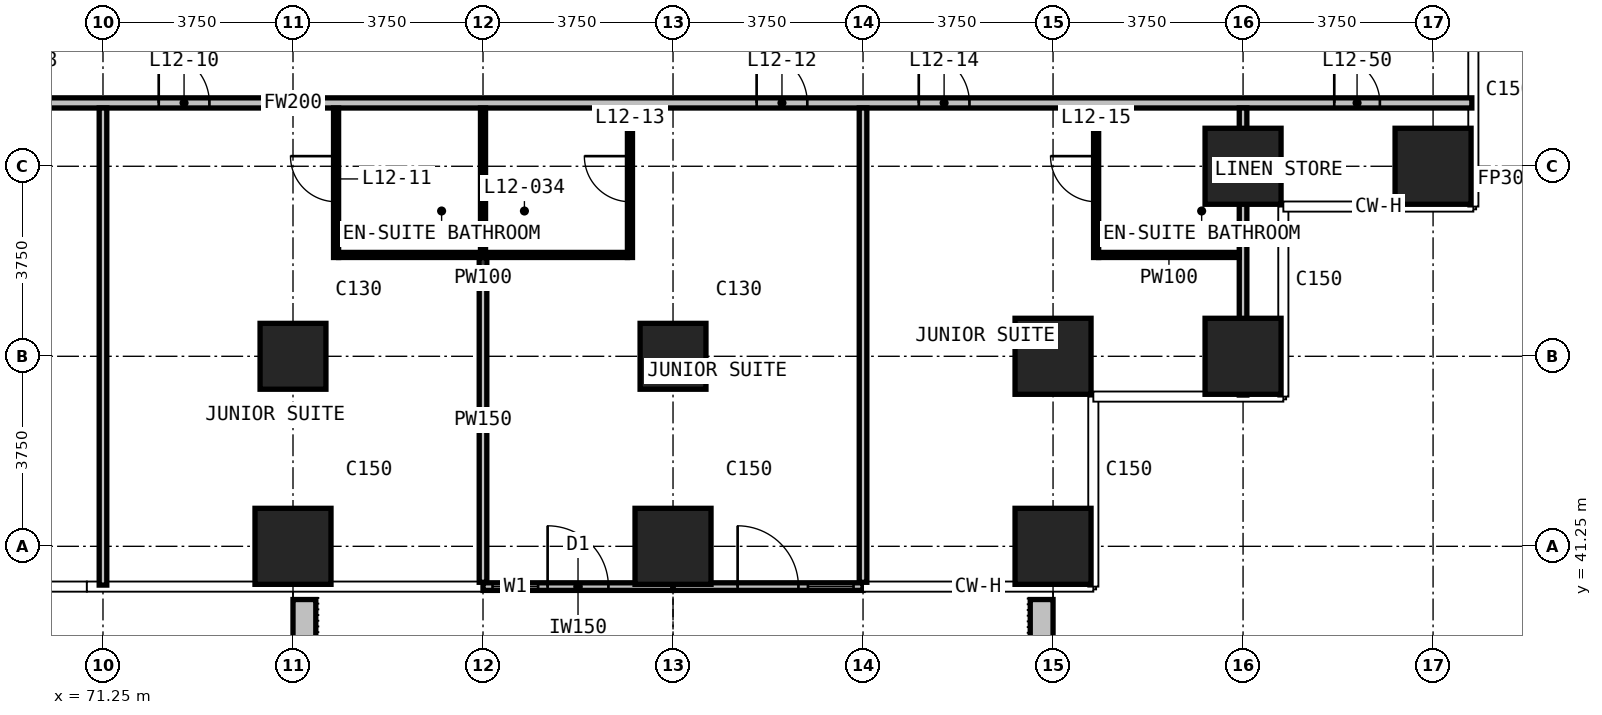
"""IFC4 building model, lengths in metres.
Left out: names, types, materials, properties, quantities, classifications, styles, units other than length and angle.
Written with IfcOpenShell. Run it as: python <this file> out.ifc"""

import sys

from ifc_helpers import new_model, si_unit, direction, frame, frame_2d, origin, origin_2d, place, context, subcontext, project, spatial, rectangle, extrude, element, fill, save


model = new_model("IFC4")
c1 = context("Model", 3, precision=1e-05, world=origin(), true_north=direction((0.0, 1.0)))
c2 = subcontext(c1, "Body", "Model", "MODEL_VIEW")
j1 = project(units=[si_unit("LENGTHUNIT", "METRE"), si_unit("PLANEANGLEUNIT", "RADIAN")], contexts=[c1])
p1 = place(None, origin())
s1 = spatial("IfcSite", under=j1, at=p1, CompositionType="ELEMENT")
p2 = place(p1, origin())
s2 = spatial("IfcBuilding", under=s1, at=p2, CompositionType="ELEMENT")
p3 = place(p2, frame((0.0, 0.0, 59.3)))
s3 = spatial("IfcBuildingStorey", under=s2, at=p3, CompositionType="ELEMENT", Elevation=59.3)
p4 = place(p3, frame((75.0, 41.25, 0.0), z_axis=(0.0, 0.0, 1.0), x_axis=(1.0, 0.0, 0.0)))
e1 = element("IfcColumn", 1, at=p4, inside=s3, PredefinedType="COLUMN", context=c2, shape_type="SweptSolid", body=[
    extrude(rectangle(XDim=1.5, YDim=1.5, at=origin_2d()), origin(), (0.0, 0.0, 1.0), 3.3),
])
p5 = place(p3, frame((75.0, 45.0, 0.0), z_axis=(0.0, 0.0, 1.0), x_axis=(1.0, 0.0, 0.0)))
e2 = element("IfcColumn", 2, at=p5, inside=s3, PredefinedType="COLUMN", context=c2, shape_type="SweptSolid", body=[
    extrude(rectangle(XDim=1.3, YDim=1.3, at=origin_2d()), origin(), (0.0, 0.0, 1.0), 3.3),
])
p6 = place(p3, frame((82.5, 41.25, 0.0), z_axis=(0.0, 0.0, 1.0), x_axis=(1.0, 0.0, 0.0)))
e3 = element("IfcColumn", 3, at=p6, inside=s3, PredefinedType="COLUMN", context=c2, shape_type="SweptSolid", body=[
    extrude(rectangle(XDim=1.5, YDim=1.5, at=origin_2d()), origin(), (0.0, 0.0, 1.0), 3.3),
])
p7 = place(p3, frame((82.5, 45.0, 0.0), z_axis=(0.0, 0.0, 1.0), x_axis=(1.0, 0.0, 0.0)))
e4 = element("IfcColumn", 4, at=p7, inside=s3, PredefinedType="COLUMN", context=c2, shape_type="SweptSolid", body=[
    extrude(rectangle(XDim=1.3, YDim=1.3, at=origin_2d()), origin(), (0.0, 0.0, 1.0), 3.3),
])
for number, where, z_axis, x_axis in (
    (5, (90.0, 41.25, 0.0), (0.0, 0.0, 1.0), (1.0, 0.0, 0.0)),
    (6, (90.0, 45.0, 0.0), (0.0, 0.0, 1.0), (1.0, 0.0, 0.0)),
    (7, (93.75, 45.0, 0.0), (0.0, 0.0, 1.0), (1.0, 0.0, 0.0)),
    (8, (93.75, 48.75, 0.0), (0.0, 0.0, 1.0), (1.0, 0.0, 0.0)),
    (9, (97.5, 48.75, 0.0), (0.0, 0.0, 1.0), (1.0, 0.0, 0.0)),
):
    element("IfcColumn", number, at=place(p3, frame(where, z_axis=z_axis, x_axis=x_axis)), inside=s3, PredefinedType="COLUMN", context=c2, shape_type="SweptSolid", body=[
        extrude(rectangle(XDim=1.5, YDim=1.5, at=origin_2d()), origin(), (0.0, 0.0, 1.0), 3.3),
    ])
p8 = place(p3, frame((78.75, 40.455, 0.0), z_axis=(0.0, 0.0, 1.0), x_axis=(1.0, 0.0, 0.0)))
e10 = element("IfcWall", 10, at=p8, inside=s3, PredefinedType="SOLIDWALL", context=c2, shape_type="SweptSolid", body=[
    extrude(rectangle(XDim=3.75, YDim=0.15, at=frame_2d((1.875, 0.0))), origin(), (0.0, 0.0, 1.0), 3.0),
])
p9 = place(p8, frame((0.188, 0.0, 0.1)))
e11 = element("IfcOpeningElement", 11, at=p9, cuts=e10, PredefinedType="OPENING", context=c2, shape_type="SweptSolid", body=[
    extrude(rectangle(XDim=0.9, YDim=2.4, at=frame_2d((0.45, 1.2))), frame((0.0, 0.085, 0.0), z_axis=(0.0, -1.0, 0.0), x_axis=(1.0, 0.0, 0.0)), (0.0, 0.0, 1.0), 0.17),
])
p10 = place(p8, frame((1.275, 0.0, 0.0)))
e12 = element("IfcOpeningElement", 12, at=p10, cuts=e10, PredefinedType="OPENING", context=c2, shape_type="SweptSolid", body=[
    extrude(rectangle(XDim=1.2, YDim=2.4, at=frame_2d((0.6, 1.2))), frame((0.0, 0.085, 0.0), z_axis=(0.0, -1.0, 0.0), x_axis=(1.0, 0.0, 0.0)), (0.0, 0.0, 1.0), 0.17),
])
p11 = place(p3, frame((82.5, 40.455, 0.0), z_axis=(0.0, 0.0, 1.0), x_axis=(1.0, 0.0, 0.0)))
e13 = element("IfcWall", 13, at=p11, inside=s3, PredefinedType="SOLIDWALL", context=c2, shape_type="SweptSolid", body=[
    extrude(rectangle(XDim=3.75, YDim=0.15, at=frame_2d((1.875, 0.0))), origin(), (0.0, 0.0, 1.0), 3.0),
])
p12 = place(p11, frame((1.275, 0.0, 0.0)))
e14 = element("IfcOpeningElement", 14, at=p12, cuts=e13, PredefinedType="OPENING", context=c2, shape_type="SweptSolid", body=[
    extrude(rectangle(XDim=1.2, YDim=2.4, at=frame_2d((0.6, 1.2))), frame((0.0, 0.085, 0.0), z_axis=(0.0, -1.0, 0.0), x_axis=(1.0, 0.0, 0.0)), (0.0, 0.0, 1.0), 0.17),
])
p13 = place(p11, frame((2.663, 0.0, 0.1)))
e15 = element("IfcOpeningElement", 15, at=p13, cuts=e13, PredefinedType="OPENING", context=c2, shape_type="SweptSolid", body=[
    extrude(rectangle(XDim=0.9, YDim=2.4, at=frame_2d((0.45, 1.2))), frame((0.0, 0.085, 0.0), z_axis=(0.0, -1.0, 0.0), x_axis=(1.0, 0.0, 0.0)), (0.0, 0.0, 1.0), 0.17),
])
for number, where, z_axis, x_axis in (
    (16, (75.225, 40.2, 0.0), (0.0, 0.0, 1.0), (0.0, -1.0, 0.0)),
    (17, (89.775, 40.2, 0.0), (0.0, 0.0, 1.0), (0.0, -1.0, 0.0)),
):
    element("IfcWall", number, at=place(p3, frame(where, z_axis=z_axis, x_axis=x_axis)), inside=s3, PredefinedType="USERDEFINED", context=c2, shape_type="SweptSolid", body=[
        extrude(rectangle(XDim=2.35, YDim=0.45, at=frame_2d((1.175, 0.0))), origin(), (0.0, 0.0, 1.0), 1.1),
    ])
p14 = place(p3, frame((51.735, 50.0, 0.0), z_axis=(0.0, 0.0, 1.0), x_axis=(1.0, 0.0, 0.0)))
e18 = element("IfcWall", 18, at=p14, inside=s3, PredefinedType="PARTITIONING", context=c2, shape_type="SweptSolid", body=[
    extrude(rectangle(XDim=46.53, YDim=0.2, at=frame_2d((23.265, 0.0))), origin(), (0.0, 0.0, 1.0), 3.0),
])
p15 = place(p14, frame((5.615, 0.0, 0.0)))
e19 = element("IfcOpeningElement", 19, at=p15, cuts=e18, PredefinedType="OPENING", context=c2, shape_type="SweptSolid", body=[
    extrude(rectangle(XDim=1.0, YDim=2.2, at=frame_2d((0.5, 1.1))), frame((0.0, 0.11, 0.0), z_axis=(0.0, -1.0, 0.0), x_axis=(1.0, 0.0, 0.0)), (0.0, 0.0, 1.0), 0.22),
])
p16 = place(p14, frame((17.415, 0.0, 0.0)))
e20 = element("IfcOpeningElement", 20, at=p16, cuts=e18, PredefinedType="OPENING", context=c2, shape_type="SweptSolid", body=[
    extrude(rectangle(XDim=1.0, YDim=2.2, at=frame_2d((0.5, 1.1))), frame((0.0, 0.11, 0.0), z_axis=(0.0, -1.0, 0.0), x_axis=(1.0, 0.0, 0.0)), (0.0, 0.0, 1.0), 0.22),
])
p17 = place(p14, frame((20.615, 0.0, 0.0)))
e21 = element("IfcOpeningElement", 21, at=p17, cuts=e18, PredefinedType="OPENING", context=c2, shape_type="SweptSolid", body=[
    extrude(rectangle(XDim=1.0, YDim=2.2, at=frame_2d((0.5, 1.1))), frame((0.0, 0.11, 0.0), z_axis=(0.0, -1.0, 0.0), x_axis=(1.0, 0.0, 0.0)), (0.0, 0.0, 1.0), 0.22),
])
p18 = place(p14, frame((32.415, 0.0, 0.0)))
e22 = element("IfcOpeningElement", 22, at=p18, cuts=e18, PredefinedType="OPENING", context=c2, shape_type="SweptSolid", body=[
    extrude(rectangle(XDim=1.0, YDim=2.2, at=frame_2d((0.5, 1.1))), frame((0.0, 0.11, 0.0), z_axis=(0.0, -1.0, 0.0), x_axis=(1.0, 0.0, 0.0)), (0.0, 0.0, 1.0), 0.22),
])
p19 = place(p14, frame((35.615, 0.0, 0.0)))
e23 = element("IfcOpeningElement", 23, at=p19, cuts=e18, PredefinedType="OPENING", context=c2, shape_type="SweptSolid", body=[
    extrude(rectangle(XDim=1.0, YDim=2.2, at=frame_2d((0.5, 1.1))), frame((0.0, 0.11, 0.0), z_axis=(0.0, -1.0, 0.0), x_axis=(1.0, 0.0, 0.0)), (0.0, 0.0, 1.0), 0.22),
])
p20 = place(p14, frame((1.8, 0.0, 0.0)))
e24 = element("IfcOpeningElement", 24, at=p20, cuts=e18, PredefinedType="OPENING", context=c2, shape_type="SweptSolid", body=[
    extrude(rectangle(XDim=0.9, YDim=2.2, at=frame_2d((0.45, 1.1))), frame((0.0, 0.11, 0.0), z_axis=(0.0, -1.0, 0.0), x_axis=(1.0, 0.0, 0.0)), (0.0, 0.0, 1.0), 0.22),
])
p21 = place(p14, frame((43.815, 0.0, 0.0)))
e25 = element("IfcOpeningElement", 25, at=p21, cuts=e18, PredefinedType="OPENING", context=c2, shape_type="SweptSolid", body=[
    extrude(rectangle(XDim=0.9, YDim=2.2, at=frame_2d((0.45, 1.1))), frame((0.0, 0.11, 0.0), z_axis=(0.0, -1.0, 0.0), x_axis=(1.0, 0.0, 0.0)), (0.0, 0.0, 1.0), 0.22),
])
p22 = place(p3, frame((71.25, 40.485, 0.0), z_axis=(0.0, 0.0, 1.0), x_axis=(0.0, 1.0, 0.0)))
e26 = element("IfcWall", 26, at=p22, inside=s3, PredefinedType="PARTITIONING", context=c2, shape_type="SweptSolid", body=[
    extrude(rectangle(XDim=9.415, YDim=0.15, at=frame_2d((4.708, 0.0))), origin(), (0.0, 0.0, 1.0), 3.0),
])
p23 = place(p3, frame((78.75, 40.54, 0.0), z_axis=(0.0, 0.0, 1.0), x_axis=(0.0, 1.0, 0.0)))
e27 = element("IfcWall", 27, at=p23, inside=s3, PredefinedType="PARTITIONING", context=c2, shape_type="SweptSolid", body=[
    extrude(rectangle(XDim=6.41, YDim=0.15, at=frame_2d((3.205, 0.0))), origin(), (0.0, 0.0, 1.0), 3.0),
])
p24 = place(p3, frame((86.25, 40.54, 0.0), z_axis=(0.0, 0.0, 1.0), x_axis=(0.0, 1.0, 0.0)))
e28 = element("IfcWall", 28, at=p24, inside=s3, PredefinedType="PARTITIONING", context=c2, shape_type="SweptSolid", body=[
    extrude(rectangle(XDim=9.36, YDim=0.15, at=frame_2d((4.68, 0.0))), origin(), (0.0, 0.0, 1.0), 3.0),
])
p25 = place(p3, frame((93.75, 44.235, 0.0), z_axis=(0.0, 0.0, 1.0), x_axis=(0.0, 1.0, 0.0)))
e29 = element("IfcWall", 29, at=p25, inside=s3, PredefinedType="PARTITIONING", context=c2, shape_type="SweptSolid", body=[
    extrude(rectangle(XDim=5.665, YDim=0.15, at=frame_2d((2.833, 0.0))), origin(), (0.0, 0.0, 1.0), 3.0),
])
p26 = place(p3, frame((75.9, 47.0, 0.0), z_axis=(0.0, 0.0, 1.0), x_axis=(1.0, 0.0, 0.0)))
e30 = element("IfcWall", 30, at=p26, inside=s3, PredefinedType="PARTITIONING", context=c2, shape_type="SweptSolid", body=[
    extrude(rectangle(XDim=5.7, YDim=0.1, at=frame_2d((2.85, 0.0))), origin(), (0.0, 0.0, 1.0), 3.0),
])
p27 = place(p3, frame((90.9, 47.0, 0.0), z_axis=(0.0, 0.0, 1.0), x_axis=(1.0, 0.0, 0.0)))
e31 = element("IfcWall", 31, at=p27, inside=s3, PredefinedType="PARTITIONING", context=c2, shape_type="SweptSolid", body=[
    extrude(rectangle(XDim=2.775, YDim=0.1, at=frame_2d((1.388, 0.0))), origin(), (0.0, 0.0, 1.0), 3.0),
])
p28 = place(p3, frame((75.85, 46.95, 0.0), z_axis=(0.0, 0.0, 1.0), x_axis=(0.0, 1.0, 0.0)))
e32 = element("IfcWall", 32, at=p28, inside=s3, PredefinedType="PARTITIONING", context=c2, shape_type="SweptSolid", body=[
    extrude(rectangle(XDim=2.95, YDim=0.1, at=frame_2d((1.475, 0.0))), origin(), (0.0, 0.0, 1.0), 3.0),
])
p29 = place(p28, frame((1.1, 0.0, 0.0)))
e33 = element("IfcOpeningElement", 33, at=p29, cuts=e32, PredefinedType="OPENING", context=c2, shape_type="SweptSolid", body=[
    extrude(rectangle(XDim=0.9, YDim=2.2, at=frame_2d((0.45, 1.1))), frame((0.0, 0.06, 0.0), z_axis=(0.0, -1.0, 0.0), x_axis=(1.0, 0.0, 0.0)), (0.0, 0.0, 1.0), 0.12),
])
p30 = place(p3, frame((78.75, 47.05, 0.0), z_axis=(0.0, 0.0, 1.0), x_axis=(0.0, 1.0, 0.0)))
e34 = element("IfcWall", 34, at=p30, inside=s3, PredefinedType="PARTITIONING", context=c2, shape_type="SweptSolid", body=[
    extrude(rectangle(XDim=2.85, YDim=0.1, at=frame_2d((1.425, 0.0))), origin(), (0.0, 0.0, 1.0), 3.0),
])
p31 = place(p3, frame((81.65, 46.95, 0.0), z_axis=(0.0, 0.0, 1.0), x_axis=(0.0, 1.0, 0.0)))
e35 = element("IfcWall", 35, at=p31, inside=s3, PredefinedType="PARTITIONING", context=c2, shape_type="SweptSolid", body=[
    extrude(rectangle(XDim=2.95, YDim=0.1, at=frame_2d((1.475, 0.0))), origin(), (0.0, 0.0, 1.0), 3.0),
])
p32 = place(p31, frame((1.1, 0.0, 0.0)))
e36 = element("IfcOpeningElement", 36, at=p32, cuts=e35, PredefinedType="OPENING", context=c2, shape_type="SweptSolid", body=[
    extrude(rectangle(XDim=0.9, YDim=2.2, at=frame_2d((0.45, 1.1))), frame((0.0, 0.06, 0.0), z_axis=(0.0, -1.0, 0.0), x_axis=(1.0, 0.0, 0.0)), (0.0, 0.0, 1.0), 0.12),
])
p33 = place(p3, frame((90.85, 46.95, 0.0), z_axis=(0.0, 0.0, 1.0), x_axis=(0.0, 1.0, 0.0)))
e37 = element("IfcWall", 37, at=p33, inside=s3, PredefinedType="PARTITIONING", context=c2, shape_type="SweptSolid", body=[
    extrude(rectangle(XDim=2.95, YDim=0.1, at=frame_2d((1.475, 0.0))), origin(), (0.0, 0.0, 1.0), 3.0),
])
p34 = place(p33, frame((1.1, 0.0, 0.0)))
e38 = element("IfcOpeningElement", 38, at=p34, cuts=e37, PredefinedType="OPENING", context=c2, shape_type="SweptSolid", body=[
    extrude(rectangle(XDim=0.9, YDim=2.2, at=frame_2d((0.45, 1.1))), frame((0.0, 0.06, 0.0), z_axis=(0.0, -1.0, 0.0), x_axis=(1.0, 0.0, 0.0)), (0.0, 0.0, 1.0), 0.12),
])
p35 = place(p9, origin())
e39 = element("IfcWindow", 39, at=p35, inside=s3, PartitioningType="SINGLE_PANEL", PredefinedType="WINDOW", context=c2, shape_type="SweptSolid", body=[
    extrude(rectangle(XDim=0.9, YDim=2.4, at=frame_2d((0.45, 1.2))), frame((0.0, 0.03, 0.0), z_axis=(0.0, -1.0, 0.0), x_axis=(1.0, 0.0, 0.0)), (0.0, 0.0, 1.0), 0.06),
])
fill(e11, e39)
p36 = place(p10, origin())
e40 = element("IfcDoor", 40, at=p36, inside=s3, OperationType="SINGLE_SWING_LEFT", PredefinedType="DOOR", context=c2, shape_type="SweptSolid", body=[
    extrude(rectangle(XDim=1.2, YDim=2.4, at=frame_2d((0.6, 1.2))), frame((0.0, 0.025, 0.0), z_axis=(0.0, -1.0, 0.0), x_axis=(1.0, 0.0, 0.0)), (0.0, 0.0, 1.0), 0.05),
])
fill(e12, e40)
p37 = place(p12, origin())
e41 = element("IfcDoor", 41, at=p37, inside=s3, OperationType="SINGLE_SWING_LEFT", PredefinedType="DOOR", context=c2, shape_type="SweptSolid", body=[
    extrude(rectangle(XDim=1.2, YDim=2.4, at=frame_2d((0.6, 1.2))), frame((0.0, 0.025, 0.0), z_axis=(0.0, -1.0, 0.0), x_axis=(1.0, 0.0, 0.0)), (0.0, 0.0, 1.0), 0.05),
])
fill(e14, e41)
p38 = place(p13, origin())
e42 = element("IfcWindow", 42, at=p38, inside=s3, PartitioningType="SINGLE_PANEL", PredefinedType="WINDOW", context=c2, shape_type="SweptSolid", body=[
    extrude(rectangle(XDim=0.9, YDim=2.4, at=frame_2d((0.45, 1.2))), frame((0.0, 0.03, 0.0), z_axis=(0.0, -1.0, 0.0), x_axis=(1.0, 0.0, 0.0)), (0.0, 0.0, 1.0), 0.06),
])
fill(e15, e42)
p39 = place(p17, origin())
e43 = element("IfcDoor", 43, at=p39, inside=s3, OperationType="SINGLE_SWING_LEFT", PredefinedType="DOOR", context=c2, shape_type="SweptSolid", body=[
    extrude(rectangle(XDim=1.0, YDim=2.2, at=frame_2d((0.5, 1.1))), frame((0.0, 0.025, 0.0), z_axis=(0.0, -1.0, 0.0), x_axis=(1.0, 0.0, 0.0)), (0.0, 0.0, 1.0), 0.05),
])
fill(e21, e43)
p40 = place(p29, origin())
e44 = element("IfcDoor", 44, at=p40, inside=s3, OperationType="SINGLE_SWING_RIGHT", PredefinedType="DOOR", context=c2, shape_type="SweptSolid", body=[
    extrude(rectangle(XDim=0.9, YDim=2.2, at=frame_2d((0.45, 1.1))), frame((0.0, 0.025, 0.0), z_axis=(0.0, -1.0, 0.0), x_axis=(1.0, 0.0, 0.0)), (0.0, 0.0, 1.0), 0.05),
])
fill(e33, e44)
p41 = place(p18, origin())
e45 = element("IfcDoor", 45, at=p41, inside=s3, OperationType="SINGLE_SWING_LEFT", PredefinedType="DOOR", context=c2, shape_type="SweptSolid", body=[
    extrude(rectangle(XDim=1.0, YDim=2.2, at=frame_2d((0.5, 1.1))), frame((0.0, 0.025, 0.0), z_axis=(0.0, -1.0, 0.0), x_axis=(1.0, 0.0, 0.0)), (0.0, 0.0, 1.0), 0.05),
])
fill(e22, e45)
p42 = place(p32, origin())
e46 = element("IfcDoor", 46, at=p42, inside=s3, OperationType="SINGLE_SWING_RIGHT", PredefinedType="DOOR", context=c2, shape_type="SweptSolid", body=[
    extrude(rectangle(XDim=0.9, YDim=2.2, at=frame_2d((0.45, 1.1))), frame((0.0, 0.025, 0.0), z_axis=(0.0, -1.0, 0.0), x_axis=(1.0, 0.0, 0.0)), (0.0, 0.0, 1.0), 0.05),
])
fill(e36, e46)
p43 = place(p19, origin())
e47 = element("IfcDoor", 47, at=p43, inside=s3, OperationType="SINGLE_SWING_RIGHT", PredefinedType="DOOR", context=c2, shape_type="SweptSolid", body=[
    extrude(rectangle(XDim=1.0, YDim=2.2, at=frame_2d((0.5, 1.1))), frame((0.0, 0.025, 0.0), z_axis=(0.0, -1.0, 0.0), x_axis=(1.0, 0.0, 0.0)), (0.0, 0.0, 1.0), 0.05),
])
fill(e23, e47)
p44 = place(p34, origin())
e48 = element("IfcDoor", 48, at=p44, inside=s3, OperationType="SINGLE_SWING_RIGHT", PredefinedType="DOOR", context=c2, shape_type="SweptSolid", body=[
    extrude(rectangle(XDim=0.9, YDim=2.2, at=frame_2d((0.45, 1.1))), frame((0.0, 0.025, 0.0), z_axis=(0.0, -1.0, 0.0), x_axis=(1.0, 0.0, 0.0)), (0.0, 0.0, 1.0), 0.05),
])
fill(e38, e48)
p45 = place(p21, origin())
e49 = element("IfcDoor", 49, at=p45, inside=s3, OperationType="SINGLE_SWING_LEFT", PredefinedType="DOOR", context=c2, shape_type="SweptSolid", body=[
    extrude(rectangle(XDim=0.9, YDim=2.2, at=frame_2d((0.45, 1.1))), frame((0.0, 0.025, 0.0), z_axis=(0.0, -1.0, 0.0), x_axis=(1.0, 0.0, 0.0)), (0.0, 0.0, 1.0), 0.05),
])
fill(e25, e49)
save(model, sys.argv[1])
